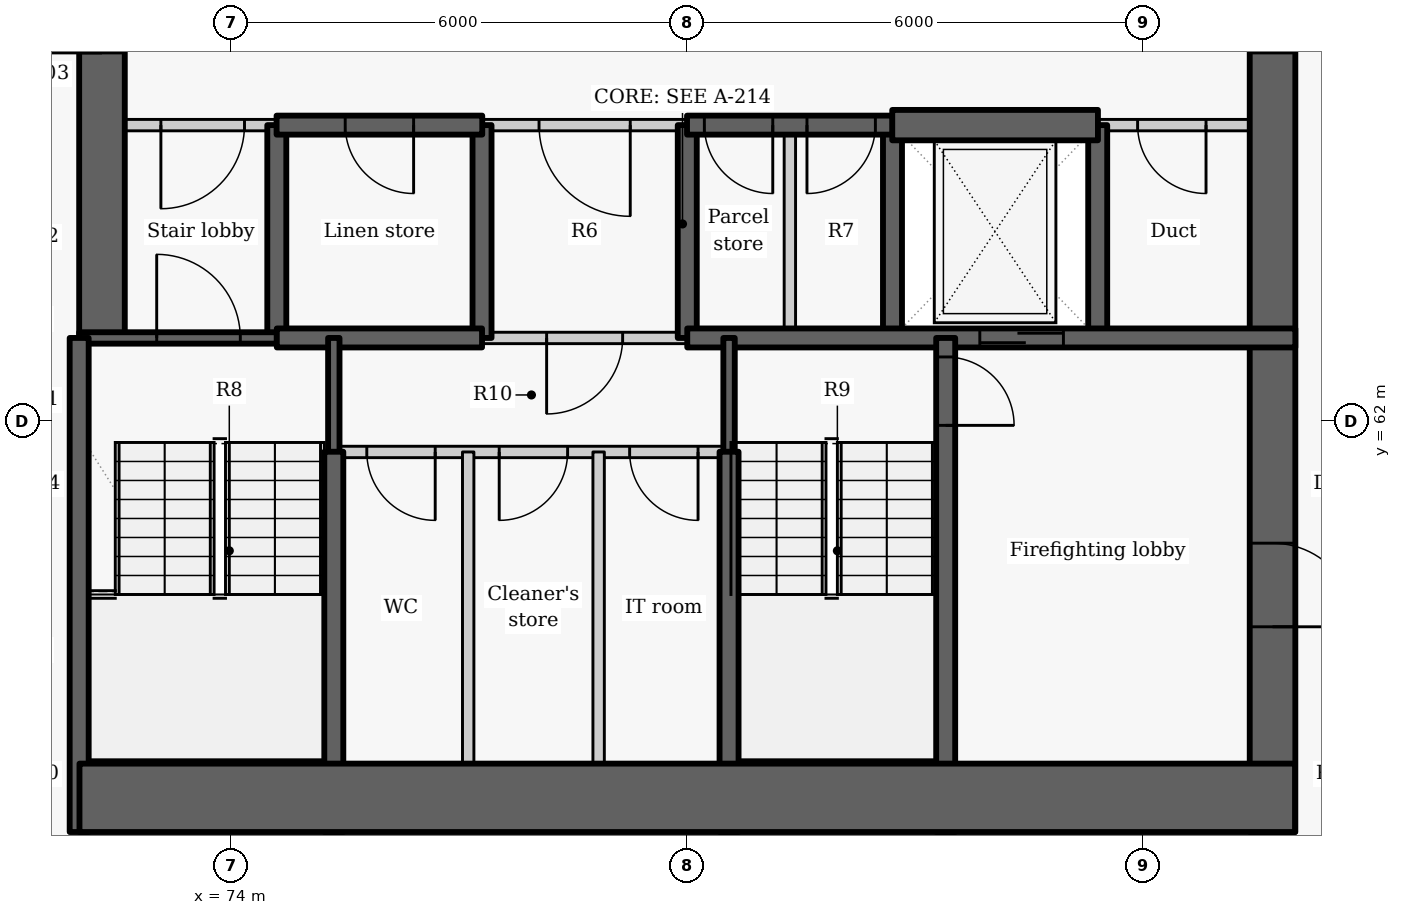
"""IFC4 building model, lengths in metres.
Left out: names, types, materials, properties, quantities, classifications, styles, units other than length and angle.
Written with IfcOpenShell. Run it as: python <this file> out.ifc"""

import sys

from ifc_helpers import new_model, si_unit, direction, frame, frame_2d, origin, place, context, subcontext, project, spatial, rectangle, extrude, element, fill, save


model = new_model("IFC4")
c1 = context("Model", 3, precision=1e-05, world=origin(), true_north=direction((0.0, 1.0)))
c2 = subcontext(c1, "Body", "Model", "MODEL_VIEW")
j1 = project(units=[si_unit("LENGTHUNIT", "METRE"), si_unit("PLANEANGLEUNIT", "RADIAN")], contexts=[c1])
p1 = place(None, origin())
s1 = spatial("IfcSite", under=j1, at=p1, CompositionType="ELEMENT")
p2 = place(p1, origin())
s2 = spatial("IfcBuilding", under=s1, at=p2, CompositionType="ELEMENT")
p3 = place(p2, frame((0.0, 0.0, 67.8)))
s3 = spatial("IfcBuildingStorey", under=s2, at=p3, CompositionType="ELEMENT", Elevation=67.8)
p4 = place(p3, frame((74.6, 63.1, -0.275), z_axis=(0.0, 0.0, 1.0), x_axis=(0.0, 1.0, 0.0)))
e1 = element("IfcWall", 1, at=p4, inside=s3, PredefinedType="SHEAR", context=c2, shape_type="SweptSolid", body=[
    extrude(rectangle(XDim=2.8, YDim=0.25, at=frame_2d((1.4, 0.0))), origin(), (0.0, 0.0, 1.0), 3.225),
])
p5 = place(p3, frame((72.3, 63.1, -0.275), z_axis=(0.0, 0.0, 1.0), x_axis=(0.0, 1.0, 0.0)))
e2 = element("IfcWall", 2, at=p5, inside=s3, PredefinedType="SHEAR", context=c2, shape_type="SweptSolid", body=[
    extrude(rectangle(XDim=9.1, YDim=0.6, at=frame_2d((4.55, 0.0))), origin(), (0.0, 0.0, 1.0), 3.225),
])
p6 = place(p5, frame((3.75, 0.0, 0.275)))
e3 = element("IfcOpeningElement", 3, at=p6, cuts=e2, PredefinedType="OPENING", context=c2, shape_type="SweptSolid", body=[
    extrude(rectangle(XDim=1.5, YDim=2.1, at=frame_2d((0.75, 1.05))), frame((0.0, 0.31, 0.0), z_axis=(0.0, -1.0, 0.0), x_axis=(1.0, 0.0, 0.0)), (0.0, 0.0, 1.0), 0.62),
])
for number, where, z_axis, x_axis in (
    (4, (77.3, 63.1, -0.275), (0.0, 0.0, 1.0), (0.0, 1.0, 0.0)),
    (5, (80.0, 63.1, -0.275), (0.0, 0.0, 1.0), (0.0, 1.0, 0.0)),
    (6, (82.7, 63.1, -0.275), (0.0, 0.0, 1.0), (0.0, 1.0, 0.0)),
    (7, (85.4, 63.1, -0.275), (0.0, 0.0, 1.0), (0.0, 1.0, 0.0)),
):
    element("IfcWall", number, at=place(p3, frame(where, z_axis=z_axis, x_axis=x_axis)), inside=s3, PredefinedType="SHEAR", context=c2, shape_type="SweptSolid", body=[
        extrude(rectangle(XDim=2.8, YDim=0.25, at=frame_2d((1.4, 0.0))), origin(), (0.0, 0.0, 1.0), 3.225),
    ])
p7 = place(p3, frame((87.7, 72.2, -0.275), z_axis=(0.0, 0.0, 1.0), x_axis=(0.0, -1.0, 0.0)))
e8 = element("IfcWall", 8, at=p7, inside=s3, PredefinedType="SHEAR", context=c2, shape_type="SweptSolid", body=[
    extrude(rectangle(XDim=15.6, YDim=0.6, at=frame_2d((7.8, 0.0))), origin(), (0.0, 0.0, 1.0), 3.225),
])
p8 = place(p7, frame((3.85, 0.0, 0.275)))
e9 = element("IfcOpeningElement", 9, at=p8, cuts=e8, PredefinedType="OPENING", context=c2, shape_type="SweptSolid", body=[
    extrude(rectangle(XDim=1.5, YDim=2.1, at=frame_2d((0.75, 1.05))), frame((0.0, 0.31, 0.0), z_axis=(0.0, -1.0, 0.0), x_axis=(1.0, 0.0, 0.0)), (0.0, 0.0, 1.0), 0.62),
])
p9 = place(p7, frame((11.8, 0.0, 0.275)))
e10 = element("IfcOpeningElement", 10, at=p9, cuts=e8, PredefinedType="OPENING", context=c2, shape_type="SweptSolid", body=[
    extrude(rectangle(XDim=1.1, YDim=2.1, at=frame_2d((0.55, 1.05))), frame((0.0, 0.31, 0.0), z_axis=(0.0, -1.0, 0.0), x_axis=(1.0, 0.0, 0.0)), (0.0, 0.0, 1.0), 0.62),
])
p10 = place(p3, frame((74.603, 65.9, 0.0), z_axis=(0.0, 0.0, 1.0), x_axis=(-1.0, 0.0, 0.0)))
e11 = element("IfcWall", 11, at=p10, inside=s3, PredefinedType="PARTITIONING", context=c2, shape_type="SweptSolid", body=[
    extrude(rectangle(XDim=2.603, YDim=0.15, at=frame_2d((1.302, 0.0))), origin(), (0.0, 0.0, 1.0), 2.95),
])
p11 = place(p10, frame((0.428, 0.0, 0.0)))
e12 = element("IfcOpeningElement", 12, at=p11, cuts=e11, PredefinedType="OPENING", context=c2, shape_type="SweptSolid", body=[
    extrude(rectangle(XDim=1.1, YDim=2.1, at=frame_2d((0.55, 1.05))), frame((0.0, 0.085, 0.0), z_axis=(0.0, -1.0, 0.0), x_axis=(1.0, 0.0, 0.0)), (0.0, 0.0, 1.0), 0.17),
])
p12 = place(p3, frame((80.003, 65.9, 0.0), z_axis=(0.0, 0.0, 1.0), x_axis=(-1.0, 0.0, 0.0)))
e13 = element("IfcWall", 13, at=p12, inside=s3, PredefinedType="PARTITIONING", context=c2, shape_type="SweptSolid", body=[
    extrude(rectangle(XDim=2.706, YDim=0.15, at=frame_2d((1.353, 0.0))), origin(), (0.0, 0.0, 1.0), 2.95),
])
p13 = place(p12, frame((0.753, 0.0, 0.0)))
e14 = element("IfcOpeningElement", 14, at=p13, cuts=e13, PredefinedType="OPENING", context=c2, shape_type="SweptSolid", body=[
    extrude(rectangle(XDim=1.2, YDim=2.1, at=frame_2d((0.6, 1.05))), frame((0.0, 0.085, 0.0), z_axis=(0.0, -1.0, 0.0), x_axis=(1.0, 0.0, 0.0)), (0.0, 0.0, 1.0), 0.17),
])
p14 = place(p3, frame((88.0, 65.9, 0.0), z_axis=(0.0, 0.0, 1.0), x_axis=(-1.0, 0.0, 0.0)))
e15 = element("IfcWall", 15, at=p14, inside=s3, PredefinedType="PARTITIONING", context=c2, shape_type="SweptSolid", body=[
    extrude(rectangle(XDim=2.603, YDim=0.15, at=frame_2d((1.302, 0.0))), origin(), (0.0, 0.0, 1.0), 2.95),
])
p15 = place(p14, frame((1.175, 0.0, 0.0)))
e16 = element("IfcOpeningElement", 16, at=p15, cuts=e15, PredefinedType="OPENING", context=c2, shape_type="SweptSolid", body=[
    extrude(rectangle(XDim=0.9, YDim=2.1, at=frame_2d((0.45, 1.05))), frame((0.0, 0.085, 0.0), z_axis=(0.0, -1.0, 0.0), x_axis=(1.0, 0.0, 0.0)), (0.0, 0.0, 1.0), 0.17),
])
p16 = place(p3, frame((77.303, 65.9, -0.275), z_axis=(0.0, 0.0, 1.0), x_axis=(-1.0, 0.0, 0.0)))
e17 = element("IfcWall", 17, at=p16, inside=s3, PredefinedType="SHEAR", context=c2, shape_type="SweptSolid", body=[
    extrude(rectangle(XDim=2.706, YDim=0.25, at=frame_2d((1.353, 0.0))), origin(), (0.0, 0.0, 1.0), 3.225),
])
p17 = place(p16, frame((0.903, 0.0, 0.275)))
e18 = element("IfcOpeningElement", 18, at=p17, cuts=e17, PredefinedType="OPENING", context=c2, shape_type="SweptSolid", body=[
    extrude(rectangle(XDim=0.9, YDim=2.1, at=frame_2d((0.45, 1.05))), frame((0.0, 0.135, 0.0), z_axis=(0.0, -1.0, 0.0), x_axis=(1.0, 0.0, 0.0)), (0.0, 0.0, 1.0), 0.27),
])
p18 = place(p3, frame((82.703, 65.9, -0.275), z_axis=(0.0, 0.0, 1.0), x_axis=(-1.0, 0.0, 0.0)))
e19 = element("IfcWall", 19, at=p18, inside=s3, PredefinedType="SHEAR", context=c2, shape_type="SweptSolid", body=[
    extrude(rectangle(XDim=2.706, YDim=0.25, at=frame_2d((1.353, 0.0))), origin(), (0.0, 0.0, 1.0), 3.225),
])
p19 = place(p18, frame((1.578, 0.0, 0.275)))
e20 = element("IfcOpeningElement", 20, at=p19, cuts=e19, PredefinedType="OPENING", context=c2, shape_type="SweptSolid", body=[
    extrude(rectangle(XDim=0.9, YDim=2.1, at=frame_2d((0.45, 1.05))), frame((0.0, 0.135, 0.0), z_axis=(0.0, -1.0, 0.0), x_axis=(1.0, 0.0, 0.0)), (0.0, 0.0, 1.0), 0.27),
])
p20 = place(p18, frame((0.228, 0.0, 0.275)))
e21 = element("IfcOpeningElement", 21, at=p20, cuts=e19, PredefinedType="OPENING", context=c2, shape_type="SweptSolid", body=[
    extrude(rectangle(XDim=0.9, YDim=2.1, at=frame_2d((0.45, 1.05))), frame((0.0, 0.135, 0.0), z_axis=(0.0, -1.0, 0.0), x_axis=(1.0, 0.0, 0.0)), (0.0, 0.0, 1.0), 0.27),
])
p21 = place(p3, frame((82.697, 65.9, -0.275), z_axis=(0.0, 0.0, 1.0), x_axis=(1.0, 0.0, 0.0)))
e22 = element("IfcWall", 22, at=p21, inside=s3, PredefinedType="SHEAR", context=c2, shape_type="SweptSolid", body=[
    extrude(rectangle(XDim=2.706, YDim=0.4, at=frame_2d((1.353, 0.0))), origin(), (0.0, 0.0, 1.0), 3.225),
])
p22 = place(p3, frame((72.0, 63.1, -0.275), z_axis=(0.0, 0.0, 1.0), x_axis=(1.0, 0.0, 0.0)))
e23 = element("IfcWall", 23, at=p22, inside=s3, PredefinedType="SHEAR", context=c2, shape_type="SweptSolid", body=[
    extrude(rectangle(XDim=2.6, YDim=0.15, at=frame_2d((1.3, 0.0))), origin(), (0.0, 0.0, 1.0), 3.225),
])
p23 = place(p22, frame((1.02, 0.0, 0.275)))
e24 = element("IfcOpeningElement", 24, at=p23, cuts=e23, PredefinedType="OPENING", context=c2, shape_type="SweptSolid", body=[
    extrude(rectangle(XDim=1.1, YDim=2.1, at=frame_2d((0.55, 1.05))), frame((0.0, 0.085, 0.0), z_axis=(0.0, -1.0, 0.0), x_axis=(1.0, 0.0, 0.0)), (0.0, 0.0, 1.0), 0.17),
])
p24 = place(p3, frame((74.6, 63.1, -0.275), z_axis=(0.0, 0.0, 1.0), x_axis=(1.0, 0.0, 0.0)))
e25 = element("IfcWall", 25, at=p24, inside=s3, PredefinedType="SHEAR", context=c2, shape_type="SweptSolid", body=[
    extrude(rectangle(XDim=2.7, YDim=0.25, at=frame_2d((1.35, 0.0))), origin(), (0.0, 0.0, 1.0), 3.225),
])
p25 = place(p3, frame((80.0, 63.1, -0.275), z_axis=(0.0, 0.0, 1.0), x_axis=(1.0, 0.0, 0.0)))
e26 = element("IfcWall", 26, at=p25, inside=s3, PredefinedType="SHEAR", context=c2, shape_type="SweptSolid", body=[
    extrude(rectangle(XDim=8.0, YDim=0.25, at=frame_2d((4.0, 0.0))), origin(), (0.0, 0.0, 1.0), 3.225),
])
p26 = place(p25, frame((3.849, 0.0, 0.275)))
e27 = element("IfcOpeningElement", 27, at=p26, cuts=e26, PredefinedType="OPENING", context=c2, shape_type="SweptSolid", body=[
    extrude(rectangle(XDim=1.1, YDim=2.1, at=frame_2d((0.55, 1.05))), frame((0.0, 0.135, 0.0), z_axis=(0.0, -1.0, 0.0), x_axis=(1.0, 0.0, 0.0)), (0.0, 0.0, 1.0), 0.27),
])
p27 = place(p3, frame((80.0, 63.1, 0.0), z_axis=(0.0, 0.0, 1.0), x_axis=(-1.0, 0.0, 0.0)))
e28 = element("IfcWall", 28, at=p27, inside=s3, PredefinedType="PARTITIONING", context=c2, shape_type="SweptSolid", body=[
    extrude(rectangle(XDim=2.7, YDim=0.15, at=frame_2d((1.35, 0.0))), origin(), (0.0, 0.0, 1.0), 2.95),
])
p28 = place(p27, frame((0.85, 0.0, 0.0)))
e29 = element("IfcOpeningElement", 29, at=p28, cuts=e28, PredefinedType="OPENING", context=c2, shape_type="SweptSolid", body=[
    extrude(rectangle(XDim=1.0, YDim=2.1, at=frame_2d((0.5, 1.05))), frame((0.0, 0.085, 0.0), z_axis=(0.0, -1.0, 0.0), x_axis=(1.0, 0.0, 0.0)), (0.0, 0.0, 1.0), 0.17),
])
p29 = place(p3, frame((81.35, 63.1, 0.0), z_axis=(0.0, 0.0, 1.0), x_axis=(0.0, 1.0, 0.0)))
e30 = element("IfcWall", 30, at=p29, inside=s3, PredefinedType="PARTITIONING", context=c2, shape_type="SweptSolid", body=[
    extrude(rectangle(XDim=2.8, YDim=0.15, at=frame_2d((1.4, 0.0))), origin(), (0.0, 0.0, 1.0), 2.95),
])
p30 = place(p3, frame((75.35, 61.597, -0.275), z_axis=(0.0, 0.0, 1.0), x_axis=(0.0, 1.0, 0.0)))
e31 = element("IfcWall", 31, at=p30, inside=s3, PredefinedType="SHEAR", context=c2, shape_type="SweptSolid", body=[
    extrude(rectangle(XDim=1.503, YDim=0.15, at=frame_2d((0.751, 0.0))), origin(), (0.0, 0.0, 1.0), 3.225),
])
p31 = place(p3, frame((75.35, 56.6, -0.275), z_axis=(0.0, 0.0, 1.0), x_axis=(0.0, 1.0, 0.0)))
e32 = element("IfcWall", 32, at=p31, inside=s3, PredefinedType="SHEAR", context=c2, shape_type="SweptSolid", body=[
    extrude(rectangle(XDim=5.003, YDim=0.25, at=frame_2d((2.501, 0.0))), origin(), (0.0, 0.0, 1.0), 3.225),
])
p32 = place(p3, frame((72.0, 56.6, -0.275), z_axis=(0.0, 0.0, 1.0), x_axis=(0.0, 1.0, 0.0)))
e33 = element("IfcWall", 33, at=p32, inside=s3, PredefinedType="SHEAR", context=c2, shape_type="SweptSolid", body=[
    extrude(rectangle(XDim=6.5, YDim=0.25, at=frame_2d((3.25, 0.0))), origin(), (0.0, 0.0, 1.0), 3.225),
])
p33 = place(p3, frame((83.4, 63.1, -0.275), z_axis=(0.0, 0.0, 1.0), x_axis=(0.0, -1.0, 0.0)))
e34 = element("IfcWall", 34, at=p33, inside=s3, PredefinedType="SHEAR", context=c2, shape_type="SweptSolid", body=[
    extrude(rectangle(XDim=6.5, YDim=0.25, at=frame_2d((3.25, 0.0))), origin(), (0.0, 0.0, 1.0), 3.225),
])
p34 = place(p33, frame((0.25, 0.0, 0.275)))
e35 = element("IfcOpeningElement", 35, at=p34, cuts=e34, PredefinedType="OPENING", context=c2, shape_type="SweptSolid", body=[
    extrude(rectangle(XDim=0.9, YDim=2.1, at=frame_2d((0.45, 1.05))), frame((0.0, 0.135, 0.0), z_axis=(0.0, -1.0, 0.0), x_axis=(1.0, 0.0, 0.0)), (0.0, 0.0, 1.0), 0.27),
])
p35 = place(p3, frame((80.55, 61.597, -0.275), z_axis=(0.0, 0.0, 1.0), x_axis=(0.0, 1.0, 0.0)))
e36 = element("IfcWall", 36, at=p35, inside=s3, PredefinedType="SHEAR", context=c2, shape_type="SweptSolid", body=[
    extrude(rectangle(XDim=1.503, YDim=0.15, at=frame_2d((0.751, 0.0))), origin(), (0.0, 0.0, 1.0), 3.225),
])
p36 = place(p3, frame((80.55, 56.6, -0.275), z_axis=(0.0, 0.0, 1.0), x_axis=(0.0, 1.0, 0.0)))
e37 = element("IfcWall", 37, at=p36, inside=s3, PredefinedType="SHEAR", context=c2, shape_type="SweptSolid", body=[
    extrude(rectangle(XDim=5.003, YDim=0.25, at=frame_2d((2.501, 0.0))), origin(), (0.0, 0.0, 1.0), 3.225),
])
p37 = place(p3, frame((80.55, 61.6, 0.0), z_axis=(0.0, 0.0, 1.0), x_axis=(-1.0, 0.0, 0.0)))
e38 = element("IfcWall", 38, at=p37, inside=s3, PredefinedType="PARTITIONING", context=c2, shape_type="SweptSolid", body=[
    extrude(rectangle(XDim=5.2, YDim=0.15, at=frame_2d((2.6, 0.0))), origin(), (0.0, 0.0, 1.0), 2.95),
])
p38 = place(p37, frame((3.866, 0.0, 0.0)))
e39 = element("IfcOpeningElement", 39, at=p38, cuts=e38, PredefinedType="OPENING", context=c2, shape_type="SweptSolid", body=[
    extrude(rectangle(XDim=0.9, YDim=2.1, at=frame_2d((0.45, 1.05))), frame((0.0, 0.085, 0.0), z_axis=(0.0, -1.0, 0.0), x_axis=(1.0, 0.0, 0.0)), (0.0, 0.0, 1.0), 0.17),
])
p39 = place(p37, frame((2.124, 0.0, 0.0)))
e40 = element("IfcOpeningElement", 40, at=p39, cuts=e38, PredefinedType="OPENING", context=c2, shape_type="SweptSolid", body=[
    extrude(rectangle(XDim=0.9, YDim=2.1, at=frame_2d((0.45, 1.05))), frame((0.0, 0.085, 0.0), z_axis=(0.0, -1.0, 0.0), x_axis=(1.0, 0.0, 0.0)), (0.0, 0.0, 1.0), 0.17),
])
p40 = place(p37, frame((0.408, 0.0, 0.0)))
e41 = element("IfcOpeningElement", 41, at=p40, cuts=e38, PredefinedType="OPENING", context=c2, shape_type="SweptSolid", body=[
    extrude(rectangle(XDim=0.9, YDim=2.1, at=frame_2d((0.45, 1.05))), frame((0.0, 0.085, 0.0), z_axis=(0.0, -1.0, 0.0), x_axis=(1.0, 0.0, 0.0)), (0.0, 0.0, 1.0), 0.17),
])
for number, where, z_axis, x_axis in (
    (42, (77.118, 56.6, 0.0), (0.0, 0.0, 1.0), (0.0, 1.0, 0.0)),
    (43, (78.834, 56.6, 0.0), (0.0, 0.0, 1.0), (0.0, 1.0, 0.0)),
):
    element("IfcWall", number, at=place(p3, frame(where, z_axis=z_axis, x_axis=x_axis)), inside=s3, PredefinedType="PARTITIONING", context=c2, shape_type="SweptSolid", body=[
        extrude(rectangle(XDim=5.0, YDim=0.15, at=frame_2d((2.5, 0.0))), origin(), (0.0, 0.0, 1.0), 2.95),
    ])
p41 = place(p3, frame((72.004, 57.05, -0.275), z_axis=(0.0, 0.0, 1.0), x_axis=(1.0, 0.0, 0.0)))
e44 = element("IfcWall", 44, at=p41, inside=s3, PredefinedType="SHEAR", context=c2, shape_type="SweptSolid", body=[
    extrude(rectangle(XDim=15.992, YDim=0.9, at=frame_2d((7.996, 0.0))), origin(), (0.0, 0.0, 1.0), 3.225),
])
p42 = place(p11, origin())
e45 = element("IfcDoor", 45, at=p42, inside=s3, OperationType="SINGLE_SWING_RIGHT", PredefinedType="DOOR", context=c2, shape_type="SweptSolid", body=[
    extrude(rectangle(XDim=1.1, YDim=2.1, at=frame_2d((0.55, 1.05))), frame((0.0, 0.025, 0.0), z_axis=(0.0, -1.0, 0.0), x_axis=(1.0, 0.0, 0.0)), (0.0, 0.0, 1.0), 0.05),
])
fill(e12, e45)
p43 = place(p17, origin())
e46 = element("IfcDoor", 46, at=p43, inside=s3, OperationType="SINGLE_SWING_LEFT", PredefinedType="DOOR", context=c2, shape_type="SweptSolid", body=[
    extrude(rectangle(XDim=0.9, YDim=2.1, at=frame_2d((0.45, 1.05))), frame((0.0, 0.025, 0.0), z_axis=(0.0, -1.0, 0.0), x_axis=(1.0, 0.0, 0.0)), (0.0, 0.0, 1.0), 0.05),
])
fill(e18, e46)
p44 = place(p13, origin())
e47 = element("IfcDoor", 47, at=p44, inside=s3, OperationType="DOUBLE_DOOR_SINGLE_SWING", PredefinedType="DOOR", context=c2, shape_type="SweptSolid", body=[
    extrude(rectangle(XDim=1.2, YDim=2.1, at=frame_2d((0.6, 1.05))), frame((0.0, 0.025, 0.0), z_axis=(0.0, -1.0, 0.0), x_axis=(1.0, 0.0, 0.0)), (0.0, 0.0, 1.0), 0.05),
])
fill(e14, e47)
p45 = place(p19, origin())
e48 = element("IfcDoor", 48, at=p45, inside=s3, OperationType="SINGLE_SWING_LEFT", PredefinedType="DOOR", context=c2, shape_type="SweptSolid", body=[
    extrude(rectangle(XDim=0.9, YDim=2.1, at=frame_2d((0.45, 1.05))), frame((0.0, 0.025, 0.0), z_axis=(0.0, -1.0, 0.0), x_axis=(1.0, 0.0, 0.0)), (0.0, 0.0, 1.0), 0.05),
])
fill(e20, e48)
p46 = place(p20, origin())
e49 = element("IfcDoor", 49, at=p46, inside=s3, OperationType="SINGLE_SWING_RIGHT", PredefinedType="DOOR", context=c2, shape_type="SweptSolid", body=[
    extrude(rectangle(XDim=0.9, YDim=2.1, at=frame_2d((0.45, 1.05))), frame((0.0, 0.025, 0.0), z_axis=(0.0, -1.0, 0.0), x_axis=(1.0, 0.0, 0.0)), (0.0, 0.0, 1.0), 0.05),
])
fill(e21, e49)
p47 = place(p26, origin())
e50 = element("IfcDoor", 50, at=p47, inside=s3, OperationType="SLIDING_TO_LEFT", PredefinedType="DOOR", context=c2, shape_type="SweptSolid", body=[
    extrude(rectangle(XDim=1.1, YDim=2.1, at=frame_2d((0.55, 1.05))), frame((0.0, 0.025, 0.0), z_axis=(0.0, -1.0, 0.0), x_axis=(1.0, 0.0, 0.0)), (0.0, 0.0, 1.0), 0.05),
])
fill(e27, e50)
p48 = place(p15, origin())
e51 = element("IfcDoor", 51, at=p48, inside=s3, OperationType="SINGLE_SWING_LEFT", PredefinedType="DOOR", context=c2, shape_type="SweptSolid", body=[
    extrude(rectangle(XDim=0.9, YDim=2.1, at=frame_2d((0.45, 1.05))), frame((0.0, 0.025, 0.0), z_axis=(0.0, -1.0, 0.0), x_axis=(1.0, 0.0, 0.0)), (0.0, 0.0, 1.0), 0.05),
])
fill(e16, e51)
p49 = place(p28, origin())
e52 = element("IfcDoor", 52, at=p49, inside=s3, OperationType="SINGLE_SWING_RIGHT", PredefinedType="DOOR", context=c2, shape_type="SweptSolid", body=[
    extrude(rectangle(XDim=1.0, YDim=2.1, at=frame_2d((0.5, 1.05))), frame((0.0, 0.025, 0.0), z_axis=(0.0, -1.0, 0.0), x_axis=(1.0, 0.0, 0.0)), (0.0, 0.0, 1.0), 0.05),
])
fill(e29, e52)
p50 = place(p38, origin())
e53 = element("IfcDoor", 53, at=p50, inside=s3, OperationType="SINGLE_SWING_LEFT", PredefinedType="DOOR", context=c2, shape_type="SweptSolid", body=[
    extrude(rectangle(XDim=0.9, YDim=2.1, at=frame_2d((0.45, 1.05))), frame((0.0, 0.025, 0.0), z_axis=(0.0, -1.0, 0.0), x_axis=(1.0, 0.0, 0.0)), (0.0, 0.0, 1.0), 0.05),
])
fill(e39, e53)
p51 = place(p39, origin())
e54 = element("IfcDoor", 54, at=p51, inside=s3, OperationType="SINGLE_SWING_RIGHT", PredefinedType="DOOR", context=c2, shape_type="SweptSolid", body=[
    extrude(rectangle(XDim=0.9, YDim=2.1, at=frame_2d((0.45, 1.05))), frame((0.0, 0.025, 0.0), z_axis=(0.0, -1.0, 0.0), x_axis=(1.0, 0.0, 0.0)), (0.0, 0.0, 1.0), 0.05),
])
fill(e40, e54)
p52 = place(p40, origin())
e55 = element("IfcDoor", 55, at=p52, inside=s3, OperationType="SINGLE_SWING_LEFT", PredefinedType="DOOR", context=c2, shape_type="SweptSolid", body=[
    extrude(rectangle(XDim=0.9, YDim=2.1, at=frame_2d((0.45, 1.05))), frame((0.0, 0.025, 0.0), z_axis=(0.0, -1.0, 0.0), x_axis=(1.0, 0.0, 0.0)), (0.0, 0.0, 1.0), 0.05),
])
fill(e41, e55)
p53 = place(p23, origin())
e56 = element("IfcDoor", 56, at=p53, inside=s3, OperationType="SINGLE_SWING_LEFT", PredefinedType="DOOR", context=c2, shape_type="SweptSolid", body=[
    extrude(rectangle(XDim=1.1, YDim=2.1, at=frame_2d((0.55, 1.05))), frame((0.0, 0.025, 0.0), z_axis=(0.0, -1.0, 0.0), x_axis=(1.0, 0.0, 0.0)), (0.0, 0.0, 1.0), 0.05),
])
fill(e24, e56)
p54 = place(p34, origin())
e57 = element("IfcDoor", 57, at=p54, inside=s3, OperationType="SINGLE_SWING_RIGHT", PredefinedType="DOOR", context=c2, shape_type="SweptSolid", body=[
    extrude(rectangle(XDim=0.9, YDim=2.1, at=frame_2d((0.45, 1.05))), frame((0.0, 0.025, 0.0), z_axis=(0.0, -1.0, 0.0), x_axis=(1.0, 0.0, 0.0)), (0.0, 0.0, 1.0), 0.05),
])
fill(e35, e57)
p55 = place(p8, origin())
e58 = element("IfcDoor", 58, at=p55, inside=s3, OperationType="DOUBLE_DOOR_SINGLE_SWING", PredefinedType="DOOR", context=c2, shape_type="SweptSolid", body=[
    extrude(rectangle(XDim=1.5, YDim=2.1, at=frame_2d((0.75, 1.05))), frame((0.0, 0.025, 0.0), z_axis=(0.0, -1.0, 0.0), x_axis=(1.0, 0.0, 0.0)), (0.0, 0.0, 1.0), 0.05),
])
fill(e9, e58)
p56 = place(p9, origin())
e59 = element("IfcDoor", 59, at=p56, inside=s3, OperationType="SINGLE_SWING_RIGHT", PredefinedType="DOOR", context=c2, shape_type="SweptSolid", body=[
    extrude(rectangle(XDim=1.1, YDim=2.1, at=frame_2d((0.55, 1.05))), frame((0.0, 0.025, 0.0), z_axis=(0.0, -1.0, 0.0), x_axis=(1.0, 0.0, 0.0)), (0.0, 0.0, 1.0), 0.05),
])
fill(e10, e59)
save(model, sys.argv[1])
